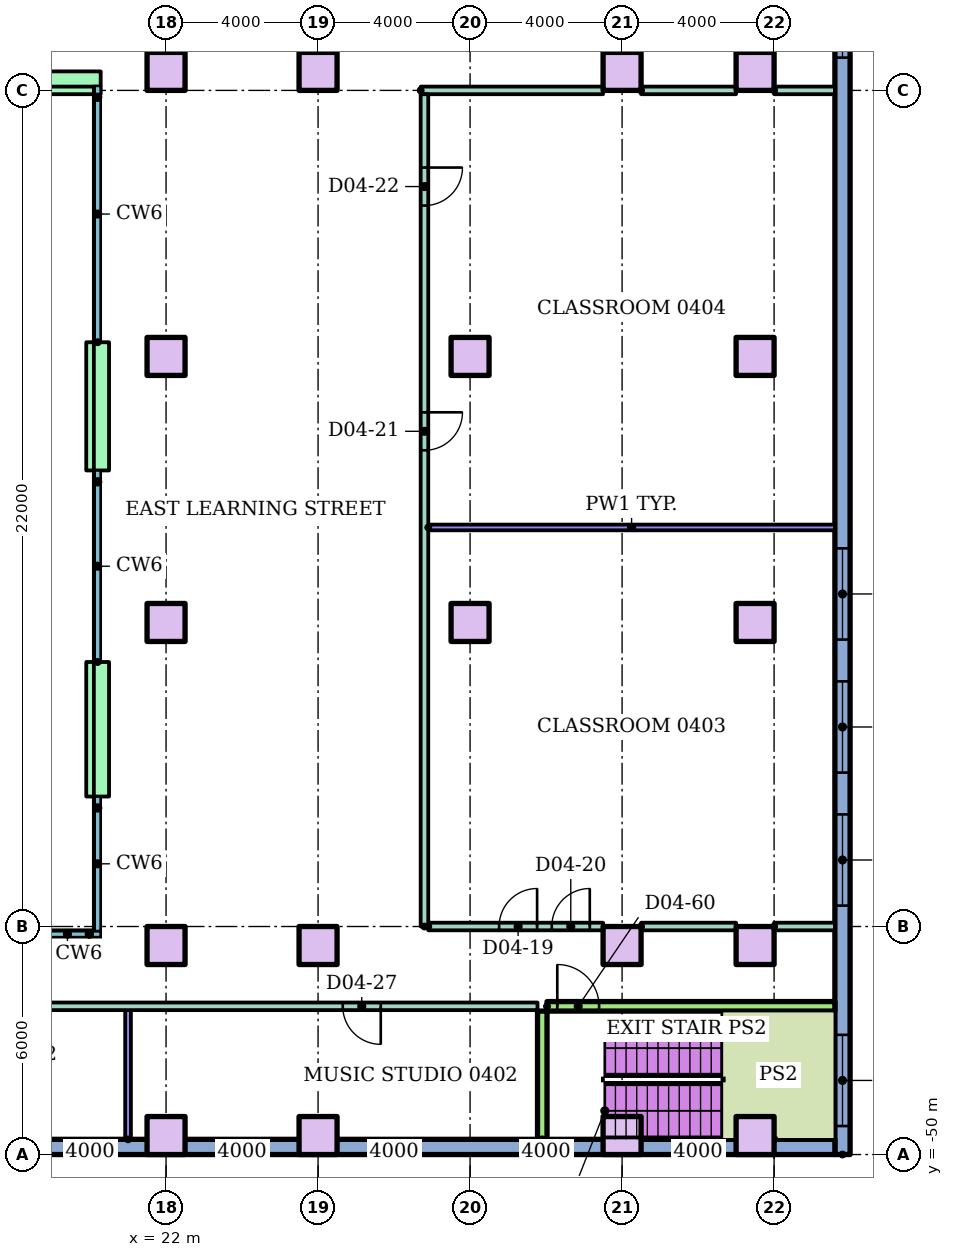
"""IFC4 building model, lengths in metres.
Left out: names, types, materials, properties, quantities, classifications, styles, units other than length and angle.
Written with IfcOpenShell. Run it as: python <this file> out.ifc"""

import sys

from ifc_helpers import new_model, si_unit, direction, frame, frame_2d, origin, origin_2d, place, context, subcontext, project, spatial, rectangle, extrude, element, fill, save


model = new_model("IFC4")
c1 = context("Model", 3, precision=1e-05, world=origin(), true_north=direction((0.0, 1.0)))
c2 = subcontext(c1, "Body", "Model", "MODEL_VIEW")
j1 = project(units=[si_unit("LENGTHUNIT", "METRE"), si_unit("PLANEANGLEUNIT", "RADIAN")], contexts=[c1])
p1 = place(None, origin())
s1 = spatial("IfcSite", under=j1, at=p1, CompositionType="ELEMENT")
p2 = place(p1, origin())
s2 = spatial("IfcBuilding", under=s1, at=p2, CompositionType="ELEMENT")
p3 = place(p2, frame((0.0, 0.0, 18.0)))
s3 = spatial("IfcBuildingStorey", under=s2, at=p3, CompositionType="ELEMENT", Elevation=18.0)
for number, where in (
    (1, (22.0, -49.5, 0.0)),
    (2, (26.0, -49.5, 0.0)),
    (3, (34.0, -49.5, 0.0)),
    (4, (37.5, -49.5, 0.0)),
    (5, (22.0, -44.5, 0.0)),
    (6, (26.0, -44.5, 0.0)),
    (7, (34.0, -44.5, 0.0)),
    (8, (37.5, -44.5, 0.0)),
    (9, (22.0, -36.0, 0.0)),
    (10, (30.0, -36.0, 0.0)),
    (11, (37.5, -36.0, 0.0)),
    (12, (22.0, -29.0, 0.0)),
    (13, (30.0, -29.0, 0.0)),
    (14, (37.5, -29.0, 0.0)),
    (15, (22.0, -21.5, 0.0)),
    (16, (26.0, -21.5, 0.0)),
    (17, (34.0, -21.5, 0.0)),
    (18, (37.5, -21.5, 0.0)),
):
    element("IfcColumn", number, at=place(p3, frame(where)), inside=s3, PredefinedType="COLUMN", context=c2, shape_type="SweptSolid", body=[
        extrude(rectangle(XDim=1.0, YDim=1.0, at=origin_2d()), origin(), (0.0, 0.0, 1.0), 4.0),
    ])
p4 = place(p3, frame((39.8, -50.0, 0.0), z_axis=(0.0, 0.0, 1.0), x_axis=(0.0, 1.0, 0.0)))
e19 = element("IfcWall", 19, at=p4, inside=s3, PredefinedType="STANDARD", context=c2, shape_type="SweptSolid", body=[
    extrude(rectangle(XDim=70.0, YDim=0.4, at=frame_2d((35.0, 0.0))), origin(), (0.0, 0.0, 1.0), 3.7),
])
p5 = place(p4, frame((0.75, 0.0, 0.9)))
e20 = element("IfcOpeningElement", 20, at=p5, cuts=e19, PredefinedType="OPENING", context=c2, shape_type="SweptSolid", body=[
    extrude(rectangle(XDim=2.4, YDim=2.1, at=frame_2d((1.2, 1.05))), frame((0.0, 0.21, 0.0), z_axis=(0.0, -1.0, 0.0), x_axis=(1.0, 0.0, 0.0)), (0.0, 0.0, 1.0), 0.42),
])
p6 = place(p4, frame((6.55, 0.0, 0.9)))
e21 = element("IfcOpeningElement", 21, at=p6, cuts=e19, PredefinedType="OPENING", context=c2, shape_type="SweptSolid", body=[
    extrude(rectangle(XDim=2.4, YDim=2.1, at=frame_2d((1.2, 1.05))), frame((0.0, 0.21, 0.0), z_axis=(0.0, -1.0, 0.0), x_axis=(1.0, 0.0, 0.0)), (0.0, 0.0, 1.0), 0.42),
])
p7 = place(p4, frame((10.05, 0.0, 0.9)))
e22 = element("IfcOpeningElement", 22, at=p7, cuts=e19, PredefinedType="OPENING", context=c2, shape_type="SweptSolid", body=[
    extrude(rectangle(XDim=2.4, YDim=2.1, at=frame_2d((1.2, 1.05))), frame((0.0, 0.21, 0.0), z_axis=(0.0, -1.0, 0.0), x_axis=(1.0, 0.0, 0.0)), (0.0, 0.0, 1.0), 0.42),
])
p8 = place(p4, frame((13.55, 0.0, 0.9)))
e23 = element("IfcOpeningElement", 23, at=p8, cuts=e19, PredefinedType="OPENING", context=c2, shape_type="SweptSolid", body=[
    extrude(rectangle(XDim=2.4, YDim=2.1, at=frame_2d((1.2, 1.05))), frame((0.0, 0.21, 0.0), z_axis=(0.0, -1.0, 0.0), x_axis=(1.0, 0.0, 0.0)), (0.0, 0.0, 1.0), 0.42),
])
p9 = place(p4, frame((28.863, 0.0, 0.9)))
e24 = element("IfcOpeningElement", 24, at=p9, cuts=e19, PredefinedType="OPENING", context=c2, shape_type="SweptSolid", body=[
    extrude(rectangle(XDim=2.4, YDim=2.1, at=frame_2d((1.2, 1.05))), frame((0.0, 0.21, 0.0), z_axis=(0.0, -1.0, 0.0), x_axis=(1.0, 0.0, 0.0)), (0.0, 0.0, 1.0), 0.42),
])
p10 = place(p4, frame((32.988, 0.0, 0.9)))
e25 = element("IfcOpeningElement", 25, at=p10, cuts=e19, PredefinedType="OPENING", context=c2, shape_type="SweptSolid", body=[
    extrude(rectangle(XDim=2.4, YDim=2.1, at=frame_2d((1.2, 1.05))), frame((0.0, 0.21, 0.0), z_axis=(0.0, -1.0, 0.0), x_axis=(1.0, 0.0, 0.0)), (0.0, 0.0, 1.0), 0.42),
])
p11 = place(p4, frame((37.113, 0.0, 0.9)))
e26 = element("IfcOpeningElement", 26, at=p11, cuts=e19, PredefinedType="OPENING", context=c2, shape_type="SweptSolid", body=[
    extrude(rectangle(XDim=2.4, YDim=2.1, at=frame_2d((1.2, 1.05))), frame((0.0, 0.21, 0.0), z_axis=(0.0, -1.0, 0.0), x_axis=(1.0, 0.0, 0.0)), (0.0, 0.0, 1.0), 0.42),
])
p12 = place(p4, frame((41.238, 0.0, 0.9)))
e27 = element("IfcOpeningElement", 27, at=p12, cuts=e19, PredefinedType="OPENING", context=c2, shape_type="SweptSolid", body=[
    extrude(rectangle(XDim=2.4, YDim=2.1, at=frame_2d((1.2, 1.05))), frame((0.0, 0.21, 0.0), z_axis=(0.0, -1.0, 0.0), x_axis=(1.0, 0.0, 0.0)), (0.0, 0.0, 1.0), 0.42),
])
p13 = place(p4, frame((45.363, 0.0, 0.9)))
e28 = element("IfcOpeningElement", 28, at=p13, cuts=e19, PredefinedType="OPENING", context=c2, shape_type="SweptSolid", body=[
    extrude(rectangle(XDim=2.4, YDim=2.1, at=frame_2d((1.2, 1.05))), frame((0.0, 0.21, 0.0), z_axis=(0.0, -1.0, 0.0), x_axis=(1.0, 0.0, 0.0)), (0.0, 0.0, 1.0), 0.42),
])
p14 = place(p4, frame((49.488, 0.0, 0.9)))
e29 = element("IfcOpeningElement", 29, at=p14, cuts=e19, PredefinedType="OPENING", context=c2, shape_type="SweptSolid", body=[
    extrude(rectangle(XDim=2.4, YDim=2.1, at=frame_2d((1.2, 1.05))), frame((0.0, 0.21, 0.0), z_axis=(0.0, -1.0, 0.0), x_axis=(1.0, 0.0, 0.0)), (0.0, 0.0, 1.0), 0.42),
])
p15 = place(p4, frame((53.613, 0.0, 0.9)))
e30 = element("IfcOpeningElement", 30, at=p15, cuts=e19, PredefinedType="OPENING", context=c2, shape_type="SweptSolid", body=[
    extrude(rectangle(XDim=2.4, YDim=2.1, at=frame_2d((1.2, 1.05))), frame((0.0, 0.21, 0.0), z_axis=(0.0, -1.0, 0.0), x_axis=(1.0, 0.0, 0.0)), (0.0, 0.0, 1.0), 0.42),
])
p16 = place(p4, frame((57.738, 0.0, 0.9)))
e31 = element("IfcOpeningElement", 31, at=p16, cuts=e19, PredefinedType="OPENING", context=c2, shape_type="SweptSolid", body=[
    extrude(rectangle(XDim=2.4, YDim=2.1, at=frame_2d((1.2, 1.05))), frame((0.0, 0.21, 0.0), z_axis=(0.0, -1.0, 0.0), x_axis=(1.0, 0.0, 0.0)), (0.0, 0.0, 1.0), 0.42),
])
p17 = place(p4, frame((62.05, 0.0, 0.9)))
e32 = element("IfcOpeningElement", 32, at=p17, cuts=e19, PredefinedType="OPENING", context=c2, shape_type="SweptSolid", body=[
    extrude(rectangle(XDim=2.4, YDim=2.1, at=frame_2d((1.2, 1.05))), frame((0.0, 0.21, 0.0), z_axis=(0.0, -1.0, 0.0), x_axis=(1.0, 0.0, 0.0)), (0.0, 0.0, 1.0), 0.42),
])
p18 = place(p4, frame((66.55, 0.0, 0.9)))
e33 = element("IfcOpeningElement", 33, at=p18, cuts=e19, PredefinedType="OPENING", context=c2, shape_type="SweptSolid", body=[
    extrude(rectangle(XDim=2.4, YDim=2.1, at=frame_2d((1.2, 1.05))), frame((0.0, 0.21, 0.0), z_axis=(0.0, -1.0, 0.0), x_axis=(1.0, 0.0, 0.0)), (0.0, 0.0, 1.0), 0.42),
])
p19 = place(p3, frame((-39.6, -49.8, 0.0)))
e34 = element("IfcWall", 34, at=p19, inside=s3, PredefinedType="STANDARD", context=c2, shape_type="SweptSolid", body=[
    extrude(rectangle(XDim=79.2, YDim=0.4, at=frame_2d((39.6, 0.0))), origin(), (0.0, 0.0, 1.0), 3.7),
])
p20 = place(p19, frame((14.135, 0.0, 0.9)))
e35 = element("IfcOpeningElement", 35, at=p20, cuts=e34, PredefinedType="OPENING", context=c2, shape_type="SweptSolid", body=[
    extrude(rectangle(XDim=2.4, YDim=2.1, at=frame_2d((1.2, 1.05))), frame((0.0, 0.21, 0.0), z_axis=(0.0, -1.0, 0.0), x_axis=(1.0, 0.0, 0.0)), (0.0, 0.0, 1.0), 0.42),
])
p21 = place(p19, frame((22.135, 0.0, 0.9)))
e36 = element("IfcOpeningElement", 36, at=p21, cuts=e34, PredefinedType="OPENING", context=c2, shape_type="SweptSolid", body=[
    extrude(rectangle(XDim=2.4, YDim=2.1, at=frame_2d((1.2, 1.05))), frame((0.0, 0.21, 0.0), z_axis=(0.0, -1.0, 0.0), x_axis=(1.0, 0.0, 0.0)), (0.0, 0.0, 1.0), 0.42),
])
p22 = place(p19, frame((30.135, 0.0, 0.9)))
e37 = element("IfcOpeningElement", 37, at=p22, cuts=e34, PredefinedType="OPENING", context=c2, shape_type="SweptSolid", body=[
    extrude(rectangle(XDim=2.05, YDim=2.1, at=frame_2d((1.025, 1.05))), frame((0.0, 0.21, 0.0), z_axis=(0.0, -1.0, 0.0), x_axis=(1.0, 0.0, 0.0)), (0.0, 0.0, 1.0), 0.42),
])
p23 = place(p19, frame((38.135, 0.0, 0.9)))
e38 = element("IfcOpeningElement", 38, at=p23, cuts=e34, PredefinedType="OPENING", context=c2, shape_type="SweptSolid", body=[
    extrude(rectangle(XDim=2.4, YDim=2.1, at=frame_2d((1.2, 1.05))), frame((0.0, 0.21, 0.0), z_axis=(0.0, -1.0, 0.0), x_axis=(1.0, 0.0, 0.0)), (0.0, 0.0, 1.0), 0.42),
])
p24 = place(p19, frame((47.015, 0.0, 0.9)))
e39 = element("IfcOpeningElement", 39, at=p24, cuts=e34, PredefinedType="OPENING", context=c2, shape_type="SweptSolid", body=[
    extrude(rectangle(XDim=1.52, YDim=2.1, at=frame_2d((0.76, 1.05))), frame((0.0, 0.21, 0.0), z_axis=(0.0, -1.0, 0.0), x_axis=(1.0, 0.0, 0.0)), (0.0, 0.0, 1.0), 0.42),
])
p25 = place(p19, frame((54.135, 0.0, 0.9)))
e40 = element("IfcOpeningElement", 40, at=p25, cuts=e34, PredefinedType="OPENING", context=c2, shape_type="SweptSolid", body=[
    extrude(rectangle(XDim=2.4, YDim=2.1, at=frame_2d((1.2, 1.05))), frame((0.0, 0.21, 0.0), z_axis=(0.0, -1.0, 0.0), x_axis=(1.0, 0.0, 0.0)), (0.0, 0.0, 1.0), 0.42),
])
p26 = place(p3, frame((18.53, -21.8, 0.0)))
e41 = element("IfcWall", 41, at=p26, inside=s3, PredefinedType="STANDARD", context=c2, shape_type="SweptSolid", body=[
    extrude(rectangle(XDim=1.75, YDim=0.6, at=frame_2d((0.875, 0.0))), origin(), (0.0, 0.0, 1.0), 3.7),
])
p27 = place(p3, frame((20.2, -28.627, 0.0), z_axis=(0.0, 0.0, 1.0), x_axis=(0.0, -1.0, 0.0)))
e42 = element("IfcWall", 42, at=p27, inside=s3, PredefinedType="STANDARD", context=c2, shape_type="SweptSolid", body=[
    extrude(rectangle(XDim=3.373, YDim=0.6, at=frame_2d((1.687, 0.0))), origin(), (0.0, 0.0, 1.0), 3.7),
])
p28 = place(p3, frame((20.2, -37.04, 0.0), z_axis=(0.0, 0.0, 1.0), x_axis=(0.0, -1.0, 0.0)))
e43 = element("IfcWall", 43, at=p28, inside=s3, PredefinedType="STANDARD", context=c2, shape_type="SweptSolid", body=[
    extrude(rectangle(XDim=3.54, YDim=0.6, at=frame_2d((1.77, 0.0))), origin(), (0.0, 0.0, 1.0), 3.7),
])
p29 = place(p3, frame((12.125, -46.1, 0.0)))
e44 = element("IfcWall", 44, at=p29, inside=s3, PredefinedType="PARTITIONING", context=c2, shape_type="SweptSolid", body=[
    extrude(rectangle(XDim=19.65, YDim=0.2, at=frame_2d((9.825, 0.0))), origin(), (0.0, 0.0, 1.0), 3.7),
])
p30 = place(p29, frame((3.925, 0.0, 0.0)))
e45 = element("IfcOpeningElement", 45, at=p30, cuts=e44, PredefinedType="OPENING", context=c2, shape_type="SweptSolid", body=[
    extrude(rectangle(XDim=0.9, YDim=2.1, at=frame_2d((0.45, 1.05))), frame((0.0, 0.11, 0.0), z_axis=(0.0, -1.0, 0.0), x_axis=(1.0, 0.0, 0.0)), (0.0, 0.0, 1.0), 0.22),
])
p31 = place(p29, frame((14.525, 0.0, 0.0)))
e46 = element("IfcOpeningElement", 46, at=p31, cuts=e44, PredefinedType="OPENING", context=c2, shape_type="SweptSolid", body=[
    extrude(rectangle(XDim=1.0, YDim=2.1, at=frame_2d((0.5, 1.05))), frame((0.0, 0.11, 0.0), z_axis=(0.0, -1.0, 0.0), x_axis=(1.0, 0.0, 0.0)), (0.0, 0.0, 1.0), 0.22),
])
p32 = place(p3, frame((32.025, -46.1, 0.0)))
e47 = element("IfcWall", 47, at=p32, inside=s3, PredefinedType="SOLIDWALL", context=c2, shape_type="SweptSolid", body=[
    extrude(rectangle(XDim=7.575, YDim=0.25, at=frame_2d((3.788, 0.0))), origin(), (0.0, 0.0, 1.0), 3.7),
])
p33 = place(p32, frame((0.27, 0.0, 0.0)))
e48 = element("IfcOpeningElement", 48, at=p33, cuts=e47, PredefinedType="OPENING", context=c2, shape_type="SweptSolid", body=[
    extrude(rectangle(XDim=1.1, YDim=2.1, at=frame_2d((0.55, 1.05))), frame((0.0, 0.135, 0.0), z_axis=(0.0, -1.0, 0.0), x_axis=(1.0, 0.0, 0.0)), (0.0, 0.0, 1.0), 0.27),
])
p34 = place(p3, frame((28.9, -44.0, 0.0)))
e49 = element("IfcWall", 49, at=p34, inside=s3, PredefinedType="PARTITIONING", context=c2, shape_type="SweptSolid", body=[
    extrude(rectangle(XDim=4.6, YDim=0.2, at=frame_2d((2.3, 0.0))), origin(), (0.0, 0.0, 1.0), 3.7),
])
p35 = place(p34, frame((1.864, 0.0, 0.0)))
e50 = element("IfcOpeningElement", 50, at=p35, cuts=e49, PredefinedType="OPENING", context=c2, shape_type="SweptSolid", body=[
    extrude(rectangle(XDim=1.0, YDim=2.1, at=frame_2d((0.5, 1.05))), frame((0.0, 0.11, 0.0), z_axis=(0.0, -1.0, 0.0), x_axis=(1.0, 0.0, 0.0)), (0.0, 0.0, 1.0), 0.22),
])
p36 = place(p34, frame((3.25, 0.0, 0.0)))
e51 = element("IfcOpeningElement", 51, at=p36, cuts=e49, PredefinedType="OPENING", context=c2, shape_type="SweptSolid", body=[
    extrude(rectangle(XDim=1.0, YDim=2.1, at=frame_2d((0.5, 1.05))), frame((0.0, 0.11, 0.0), z_axis=(0.0, -1.0, 0.0), x_axis=(1.0, 0.0, 0.0)), (0.0, 0.0, 1.0), 0.22),
])
p37 = place(p3, frame((34.5, -44.0, 0.0)))
e52 = element("IfcWall", 52, at=p37, inside=s3, PredefinedType="PARTITIONING", context=c2, shape_type="SweptSolid", body=[
    extrude(rectangle(XDim=2.5, YDim=0.2, at=frame_2d((1.25, 0.0))), origin(), (0.0, 0.0, 1.0), 3.7),
])
p38 = place(p3, frame((38.0, -44.0, 0.0)))
e53 = element("IfcWall", 53, at=p38, inside=s3, PredefinedType="PARTITIONING", context=c2, shape_type="SweptSolid", body=[
    extrude(rectangle(XDim=1.6, YDim=0.2, at=frame_2d((0.8, 0.0))), origin(), (0.0, 0.0, 1.0), 3.7),
])
p39 = place(p3, frame((28.9, -33.5, 0.0)))
e54 = element("IfcWall", 54, at=p39, inside=s3, PredefinedType="PARTITIONING", context=c2, shape_type="SweptSolid", body=[
    extrude(rectangle(XDim=10.7, YDim=0.15, at=frame_2d((5.35, 0.0))), origin(), (0.0, 0.0, 1.0), 3.7),
])
p40 = place(p3, frame((28.7, -22.0, 0.0)))
e55 = element("IfcWall", 55, at=p40, inside=s3, PredefinedType="PARTITIONING", context=c2, shape_type="SweptSolid", body=[
    extrude(rectangle(XDim=4.8, YDim=0.2, at=frame_2d((2.4, 0.0))), origin(), (0.0, 0.0, 1.0), 3.7),
])
p41 = place(p3, frame((34.5, -22.0, 0.0)))
e56 = element("IfcWall", 56, at=p41, inside=s3, PredefinedType="PARTITIONING", context=c2, shape_type="SweptSolid", body=[
    extrude(rectangle(XDim=2.5, YDim=0.2, at=frame_2d((1.25, 0.0))), origin(), (0.0, 0.0, 1.0), 3.7),
])
p42 = place(p3, frame((38.0, -22.0, 0.0)))
e57 = element("IfcWall", 57, at=p42, inside=s3, PredefinedType="PARTITIONING", context=c2, shape_type="SweptSolid", body=[
    extrude(rectangle(XDim=1.6, YDim=0.2, at=frame_2d((0.8, 0.0))), origin(), (0.0, 0.0, 1.0), 3.7),
])
p43 = place(p3, frame((21.0, -49.6, 0.0), z_axis=(0.0, 0.0, 1.0), x_axis=(0.0, 1.0, 0.0)))
e58 = element("IfcWall", 58, at=p43, inside=s3, PredefinedType="PARTITIONING", context=c2, shape_type="SweptSolid", body=[
    extrude(rectangle(XDim=3.4, YDim=0.15, at=frame_2d((1.7, 0.0))), origin(), (0.0, 0.0, 1.0), 3.7),
])
p44 = place(p3, frame((28.8, -44.0, 0.0), z_axis=(0.0, 0.0, 1.0), x_axis=(0.0, 1.0, 0.0)))
e59 = element("IfcWall", 59, at=p44, inside=s3, PredefinedType="PARTITIONING", context=c2, shape_type="SweptSolid", body=[
    extrude(rectangle(XDim=21.9, YDim=0.2, at=frame_2d((10.95, 0.0))), origin(), (0.0, 0.0, 1.0), 3.7),
])
p45 = place(p44, frame((12.53, 0.0, 0.0)))
e60 = element("IfcOpeningElement", 60, at=p45, cuts=e59, PredefinedType="OPENING", context=c2, shape_type="SweptSolid", body=[
    extrude(rectangle(XDim=1.0, YDim=2.1, at=frame_2d((0.5, 1.05))), frame((0.0, 0.11, 0.0), z_axis=(0.0, -1.0, 0.0), x_axis=(1.0, 0.0, 0.0)), (0.0, 0.0, 1.0), 0.22),
])
p46 = place(p44, frame((18.97, 0.0, 0.0)))
e61 = element("IfcOpeningElement", 61, at=p46, cuts=e59, PredefinedType="OPENING", context=c2, shape_type="SweptSolid", body=[
    extrude(rectangle(XDim=1.0, YDim=2.1, at=frame_2d((0.5, 1.05))), frame((0.0, 0.11, 0.0), z_axis=(0.0, -1.0, 0.0), x_axis=(1.0, 0.0, 0.0)), (0.0, 0.0, 1.0), 0.22),
])
p47 = place(p3, frame((31.9, -49.6, 0.0), z_axis=(0.0, 0.0, 1.0), x_axis=(0.0, 1.0, 0.0)))
e62 = element("IfcWall", 62, at=p47, inside=s3, PredefinedType="SOLIDWALL", context=c2, shape_type="SweptSolid", body=[
    extrude(rectangle(XDim=3.375, YDim=0.25, at=frame_2d((1.688, 0.0))), origin(), (0.0, 0.0, 1.0), 3.7),
])
p48 = place(p5, origin())
e63 = element("IfcWindow", 63, at=p48, inside=s3, PartitioningType="SINGLE_PANEL", PredefinedType="WINDOW", context=c2, shape_type="SweptSolid", body=[
    extrude(rectangle(XDim=2.4, YDim=2.1, at=frame_2d((1.2, 1.05))), frame((0.0, 0.03, 0.0), z_axis=(0.0, -1.0, 0.0), x_axis=(1.0, 0.0, 0.0)), (0.0, 0.0, 1.0), 0.06),
])
fill(e20, e63)
p49 = place(p6, origin())
e64 = element("IfcWindow", 64, at=p49, inside=s3, PartitioningType="SINGLE_PANEL", PredefinedType="WINDOW", context=c2, shape_type="SweptSolid", body=[
    extrude(rectangle(XDim=2.4, YDim=2.1, at=frame_2d((1.2, 1.05))), frame((0.0, 0.03, 0.0), z_axis=(0.0, -1.0, 0.0), x_axis=(1.0, 0.0, 0.0)), (0.0, 0.0, 1.0), 0.06),
])
fill(e21, e64)
p50 = place(p7, origin())
e65 = element("IfcWindow", 65, at=p50, inside=s3, PartitioningType="SINGLE_PANEL", PredefinedType="WINDOW", context=c2, shape_type="SweptSolid", body=[
    extrude(rectangle(XDim=2.4, YDim=2.1, at=frame_2d((1.2, 1.05))), frame((0.0, 0.03, 0.0), z_axis=(0.0, -1.0, 0.0), x_axis=(1.0, 0.0, 0.0)), (0.0, 0.0, 1.0), 0.06),
])
fill(e22, e65)
p51 = place(p8, origin())
e66 = element("IfcWindow", 66, at=p51, inside=s3, PartitioningType="SINGLE_PANEL", PredefinedType="WINDOW", context=c2, shape_type="SweptSolid", body=[
    extrude(rectangle(XDim=2.4, YDim=2.1, at=frame_2d((1.2, 1.05))), frame((0.0, 0.03, 0.0), z_axis=(0.0, -1.0, 0.0), x_axis=(1.0, 0.0, 0.0)), (0.0, 0.0, 1.0), 0.06),
])
fill(e23, e66)
p52 = place(p9, origin())
e67 = element("IfcWindow", 67, at=p52, inside=s3, PartitioningType="SINGLE_PANEL", PredefinedType="WINDOW", context=c2, shape_type="SweptSolid", body=[
    extrude(rectangle(XDim=2.4, YDim=2.1, at=frame_2d((1.2, 1.05))), frame((0.0, 0.03, 0.0), z_axis=(0.0, -1.0, 0.0), x_axis=(1.0, 0.0, 0.0)), (0.0, 0.0, 1.0), 0.06),
])
fill(e24, e67)
p53 = place(p35, origin())
e68 = element("IfcDoor", 68, at=p53, inside=s3, OperationType="SINGLE_SWING_RIGHT", PredefinedType="DOOR", context=c2, shape_type="SweptSolid", body=[
    extrude(rectangle(XDim=1.0, YDim=2.1, at=frame_2d((0.5, 1.05))), frame((0.0, 0.025, 0.0), z_axis=(0.0, -1.0, 0.0), x_axis=(1.0, 0.0, 0.0)), (0.0, 0.0, 1.0), 0.05),
])
fill(e50, e68)
p54 = place(p36, origin())
e69 = element("IfcDoor", 69, at=p54, inside=s3, OperationType="SINGLE_SWING_RIGHT", PredefinedType="DOOR", context=c2, shape_type="SweptSolid", body=[
    extrude(rectangle(XDim=1.0, YDim=2.1, at=frame_2d((0.5, 1.05))), frame((0.0, 0.025, 0.0), z_axis=(0.0, -1.0, 0.0), x_axis=(1.0, 0.0, 0.0)), (0.0, 0.0, 1.0), 0.05),
])
fill(e51, e69)
p55 = place(p45, frame((1.0, 0.0, 0.0), z_axis=(0.0, 0.0, 1.0), x_axis=(-1.0, 0.0, 0.0)))
e70 = element("IfcDoor", 70, at=p55, inside=s3, OperationType="SINGLE_SWING_RIGHT", PredefinedType="DOOR", context=c2, shape_type="SweptSolid", body=[
    extrude(rectangle(XDim=1.0, YDim=2.1, at=frame_2d((0.5, 1.05))), frame((0.0, 0.025, 0.0), z_axis=(0.0, -1.0, 0.0), x_axis=(1.0, 0.0, 0.0)), (0.0, 0.0, 1.0), 0.05),
])
fill(e60, e70)
p56 = place(p46, frame((1.0, 0.0, 0.0), z_axis=(0.0, 0.0, 1.0), x_axis=(-1.0, 0.0, 0.0)))
e71 = element("IfcDoor", 71, at=p56, inside=s3, OperationType="SINGLE_SWING_RIGHT", PredefinedType="DOOR", context=c2, shape_type="SweptSolid", body=[
    extrude(rectangle(XDim=1.0, YDim=2.1, at=frame_2d((0.5, 1.05))), frame((0.0, 0.025, 0.0), z_axis=(0.0, -1.0, 0.0), x_axis=(1.0, 0.0, 0.0)), (0.0, 0.0, 1.0), 0.05),
])
fill(e61, e71)
p57 = place(p31, frame((1.0, 0.0, 0.0), z_axis=(0.0, 0.0, 1.0), x_axis=(-1.0, 0.0, 0.0)))
e72 = element("IfcDoor", 72, at=p57, inside=s3, OperationType="SINGLE_SWING_RIGHT", PredefinedType="DOOR", context=c2, shape_type="SweptSolid", body=[
    extrude(rectangle(XDim=1.0, YDim=2.1, at=frame_2d((0.5, 1.05))), frame((0.0, 0.025, 0.0), z_axis=(0.0, -1.0, 0.0), x_axis=(1.0, 0.0, 0.0)), (0.0, 0.0, 1.0), 0.05),
])
fill(e46, e72)
p58 = place(p33, origin())
e73 = element("IfcDoor", 73, at=p58, inside=s3, OperationType="SINGLE_SWING_LEFT", PredefinedType="DOOR", context=c2, shape_type="SweptSolid", body=[
    extrude(rectangle(XDim=1.1, YDim=2.1, at=frame_2d((0.55, 1.05))), frame((0.0, 0.025, 0.0), z_axis=(0.0, -1.0, 0.0), x_axis=(1.0, 0.0, 0.0)), (0.0, 0.0, 1.0), 0.05),
])
fill(e48, e73)
save(model, sys.argv[1])
